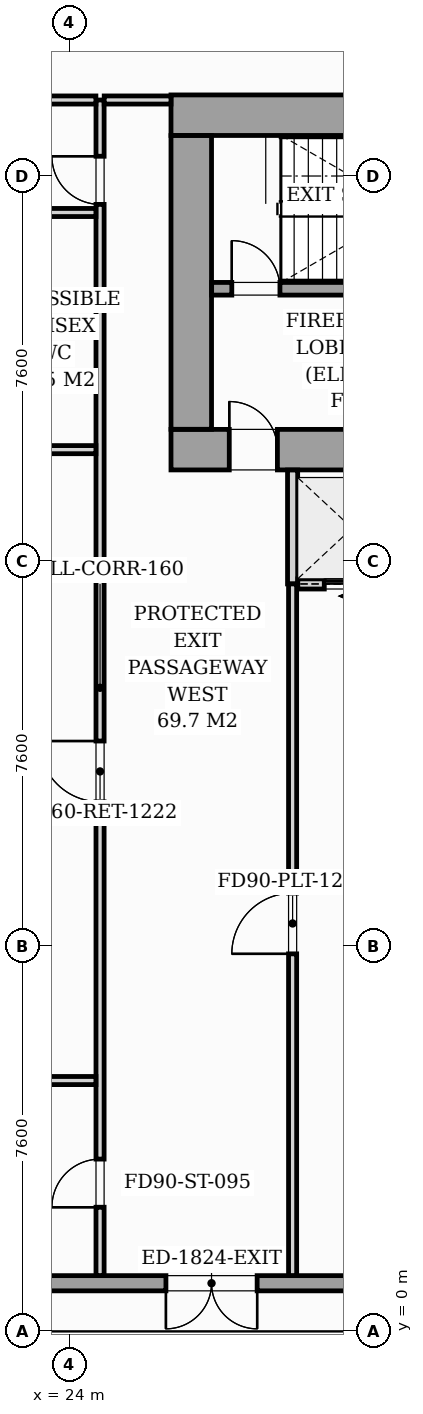
"""IFC4 building model, lengths in metres.
Left out: names, types, materials, properties, quantities, classifications, styles, units other than length and angle.
Written with IfcOpenShell. Run it as: python <this file> out.ifc"""

import sys

from ifc_helpers import new_model, si_unit, direction, frame, frame_2d, origin, origin_2d, place, context, subcontext, project, spatial, rectangle, i_section, extrude, source, transform, mapped, element, fill, save


model = new_model("IFC4")
c1 = context("Model", 3, precision=1e-05, world=origin(), true_north=direction((0.0, 1.0)))
c2 = subcontext(c1, "Body", "Model", "MODEL_VIEW")
j1 = project(units=[si_unit("LENGTHUNIT", "METRE"), si_unit("PLANEANGLEUNIT", "RADIAN")], contexts=[c1])
p1 = place(None, origin())
s1 = spatial("IfcSite", under=j1, at=p1, CompositionType="ELEMENT")
p2 = place(p1, origin())
s2 = spatial("IfcBuilding", under=s1, at=p2, CompositionType="ELEMENT")
p3 = place(p2, origin())
s3 = spatial("IfcBuildingStorey", under=s2, at=p3, CompositionType="ELEMENT", Elevation=0.0)
m1 = source(origin(), c2, "Body", "SweptSolid", [
    extrude(i_section(OverallWidth=0.437, OverallDepth=0.514, WebThickness=0.061, FlangeThickness=0.097, FilletRadius=0.018, at=origin_2d()), origin(), (0.0, 0.0, 1.0), 4.996),
])
for number, where, z_axis, x_axis in (
    (1, (26.4, 17.4, 0.002), (0.0, 0.0, 1.0), (1.0, 0.0, 0.0)),
    (2, (26.4, 24.0, 0.002), (0.0, 0.0, 1.0), (1.0, 0.0, 0.0)),
):
    element("IfcColumn", number, at=place(p3, frame(where, z_axis=z_axis, x_axis=x_axis)), inside=s3, PredefinedType="PILASTER", context=c2, shape_type="MappedRepresentation", body=[
        mapped(m1, transform((0.0, 0.0, 0.0), scale=1.0)),
    ])
p4 = place(p3, frame((47.0, 0.95, 0.0), z_axis=(0.0, 0.0, 1.0), x_axis=(-1.0, 0.0, 0.0)))
e3 = element("IfcWall", 3, at=p4, inside=s3, PredefinedType="STANDARD", context=c2, shape_type="SweptSolid", body=[
    extrude(rectangle(XDim=29.0, YDim=0.3, at=frame_2d((14.5, 0.0))), origin(), (0.0, 0.0, 1.0), 4.58),
])
p5 = place(p4, frame((1.15, 0.0, 0.0)))
e4 = element("IfcOpeningElement", 4, at=p5, cuts=e3, PredefinedType="OPENING", context=c2, shape_type="SweptSolid", body=[
    extrude(rectangle(XDim=1.8, YDim=2.4, at=frame_2d((0.9, 1.2))), frame((0.0, 0.16, 0.0), z_axis=(0.0, -1.0, 0.0), x_axis=(1.0, 0.0, 0.0)), (0.0, 0.0, 1.0), 0.32),
])
p6 = place(p4, frame((9.2, 0.0, 0.0)))
e5 = element("IfcOpeningElement", 5, at=p6, cuts=e3, PredefinedType="OPENING", context=c2, shape_type="SweptSolid", body=[
    extrude(rectangle(XDim=1.8, YDim=2.4, at=frame_2d((0.9, 1.2))), frame((0.0, 0.16, 0.0), z_axis=(0.0, -1.0, 0.0), x_axis=(1.0, 0.0, 0.0)), (0.0, 0.0, 1.0), 0.32),
])
p7 = place(p4, frame((11.3, 0.0, 0.65)))
e6 = element("IfcOpeningElement", 6, at=p7, cuts=e3, PredefinedType="OPENING", context=c2, shape_type="SweptSolid", body=[
    extrude(rectangle(XDim=2.0, YDim=2.4, at=frame_2d((1.0, 1.2))), frame((0.0, 0.16, 0.0), z_axis=(0.0, -1.0, 0.0), x_axis=(1.0, 0.0, 0.0)), (0.0, 0.0, 1.0), 0.32),
])
p8 = place(p4, frame((13.6, 0.0, 0.0)))
e7 = element("IfcOpeningElement", 7, at=p8, cuts=e3, PredefinedType="OPENING", context=c2, shape_type="SweptSolid", body=[
    extrude(rectangle(XDim=1.8, YDim=2.4, at=frame_2d((0.9, 1.2))), frame((0.0, 0.16, 0.0), z_axis=(0.0, -1.0, 0.0), x_axis=(1.0, 0.0, 0.0)), (0.0, 0.0, 1.0), 0.32),
])
p9 = place(p4, frame((19.3, 0.0, 0.0)))
e8 = element("IfcOpeningElement", 8, at=p9, cuts=e3, PredefinedType="OPENING", context=c2, shape_type="SweptSolid", body=[
    extrude(rectangle(XDim=1.8, YDim=2.4, at=frame_2d((0.9, 1.2))), frame((0.0, 0.16, 0.0), z_axis=(0.0, -1.0, 0.0), x_axis=(1.0, 0.0, 0.0)), (0.0, 0.0, 1.0), 0.32),
])
p10 = place(p4, frame((26.8, 0.0, 0.0)))
e9 = element("IfcOpeningElement", 9, at=p10, cuts=e3, PredefinedType="OPENING", context=c2, shape_type="SweptSolid", body=[
    extrude(rectangle(XDim=1.0, YDim=2.2, at=frame_2d((0.5, 1.1))), frame((0.0, 0.16, 0.0), z_axis=(0.0, -1.0, 0.0), x_axis=(1.0, 0.0, 0.0)), (0.0, 0.0, 1.0), 0.32),
])
p11 = place(p3, frame((26.0, 17.4, 0.0), z_axis=(0.0, 0.0, 1.0), x_axis=(1.0, 0.0, 0.0)))
e10 = element("IfcWall", 10, at=p11, inside=s3, PredefinedType="SHEAR", context=c2, shape_type="SweptSolid", body=[
    extrude(rectangle(XDim=20.0, YDim=0.8, at=frame_2d((10.0, 0.0))), origin(), (0.0, 0.0, 1.0), 5.0),
])
p12 = place(p11, frame((1.15, 0.0, 0.0)))
e11 = element("IfcOpeningElement", 11, at=p12, cuts=e10, PredefinedType="OPENING", context=c2, shape_type="SweptSolid", body=[
    extrude(rectangle(XDim=0.95, YDim=2.06, at=frame_2d((0.475, 1.03))), frame((0.0, 0.41, 0.0), z_axis=(0.0, -1.0, 0.0), x_axis=(1.0, 0.0, 0.0)), (0.0, 0.0, 1.0), 0.82),
])
p13 = place(p11, frame((9.58, 0.0, 0.0)))
e12 = element("IfcOpeningElement", 12, at=p13, cuts=e10, PredefinedType="OPENING", context=c2, shape_type="SweptSolid", body=[
    extrude(rectangle(XDim=0.9, YDim=2.06, at=frame_2d((0.45, 1.03))), frame((0.0, 0.41, 0.0), z_axis=(0.0, -1.0, 0.0), x_axis=(1.0, 0.0, 0.0)), (0.0, 0.0, 1.0), 0.82),
])
p14 = place(p11, frame((17.75, 0.0, 0.0)))
e13 = element("IfcOpeningElement", 13, at=p14, cuts=e10, PredefinedType="OPENING", context=c2, shape_type="SweptSolid", body=[
    extrude(rectangle(XDim=0.95, YDim=2.06, at=frame_2d((0.475, 1.03))), frame((0.0, 0.41, 0.0), z_axis=(0.0, -1.0, 0.0), x_axis=(1.0, 0.0, 0.0)), (0.0, 0.0, 1.0), 0.82),
])
p15 = place(p3, frame((26.0, 24.0, 0.0), z_axis=(0.0, 0.0, 1.0), x_axis=(1.0, 0.0, 0.0)))
e14 = element("IfcWall", 14, at=p15, inside=s3, PredefinedType="SHEAR", context=c2, shape_type="SweptSolid", body=[
    extrude(rectangle(XDim=20.0, YDim=0.8, at=frame_2d((10.0, 0.0))), origin(), (0.0, 0.0, 1.0), 5.0),
])
p16 = place(p3, frame((26.4, 17.802, 0.0), z_axis=(0.0, 0.0, 1.0), x_axis=(0.0, 1.0, 0.0)))
e15 = element("IfcWall", 15, at=p16, inside=s3, PredefinedType="SHEAR", context=c2, shape_type="SweptSolid", body=[
    extrude(rectangle(XDim=5.796, YDim=0.8, at=frame_2d((2.898, 0.0))), origin(), (0.0, 0.0, 1.0), 5.0),
])
p17 = place(p3, frame((26.802, 20.575, 0.0), z_axis=(0.0, 0.0, 1.0), x_axis=(1.0, 0.0, 0.0)))
e16 = element("IfcWall", 16, at=p17, inside=s3, PredefinedType="SOLIDWALL", context=c2, shape_type="SweptSolid", body=[
    extrude(rectangle(XDim=8.148, YDim=0.25, at=frame_2d((4.074, 0.0))), origin(), (0.0, 0.0, 1.0), 5.0),
])
p18 = place(p17, frame((0.398, 0.0, 0.0)))
e17 = element("IfcOpeningElement", 17, at=p18, cuts=e16, PredefinedType="OPENING", context=c2, shape_type="SweptSolid", body=[
    extrude(rectangle(XDim=0.95, YDim=2.06, at=frame_2d((0.475, 1.03))), frame((0.0, 0.135, 0.0), z_axis=(0.0, -1.0, 0.0), x_axis=(1.0, 0.0, 0.0)), (0.0, 0.0, 1.0), 0.27),
])
p19 = place(p3, frame((28.4, 14.75, 0.0), z_axis=(0.0, 0.0, 1.0), x_axis=(0.0, 1.0, 0.0)))
e18 = element("IfcWall", 18, at=p19, inside=s3, PredefinedType="PARTITIONING", context=c2, shape_type="SweptSolid", body=[
    extrude(rectangle(XDim=2.248, YDim=0.2, at=frame_2d((1.124, 0.0))), origin(), (0.0, 0.0, 1.0), 4.58),
])
p20 = place(p3, frame((28.502, 14.75, 0.0), z_axis=(0.0, 0.0, 1.0), x_axis=(1.0, 0.0, 0.0)))
e19 = element("IfcWall", 19, at=p20, inside=s3, PredefinedType="PARTITIONING", context=c2, shape_type="SweptSolid", body=[
    extrude(rectangle(XDim=2.146, YDim=0.2, at=frame_2d((1.073, 0.0))), origin(), (0.0, 0.0, 1.0), 4.58),
])
p21 = place(p20, frame((0.523, 0.0, 0.0)))
e20 = element("IfcOpeningElement", 20, at=p21, cuts=e19, PredefinedType="OPENING", context=c2, shape_type="SweptSolid", body=[
    extrude(rectangle(XDim=1.05, YDim=2.08, at=frame_2d((0.525, 1.04))), frame((0.0, 0.11, 0.0), z_axis=(0.0, -1.0, 0.0), x_axis=(1.0, 0.0, 0.0)), (0.0, 0.0, 1.0), 0.22),
])
p22 = place(p3, frame((24.6, 1.102, 0.0), z_axis=(0.0, 0.0, 1.0), x_axis=(0.0, 1.0, 0.0)))
e21 = element("IfcWall", 21, at=p22, inside=s3, PredefinedType="PARTITIONING", context=c2, shape_type="SweptSolid", body=[
    extrude(rectangle(XDim=23.198, YDim=0.16, at=frame_2d((11.599, 0.0))), origin(), (0.0, 0.0, 1.0), 4.58),
])
p23 = place(p22, frame((1.348, 0.0, 0.0)))
e22 = element("IfcOpeningElement", 22, at=p23, cuts=e21, PredefinedType="OPENING", context=c2, shape_type="SweptSolid", body=[
    extrude(rectangle(XDim=0.95, YDim=2.06, at=frame_2d((0.475, 1.03))), frame((0.0, 0.09, 0.0), z_axis=(0.0, -1.0, 0.0), x_axis=(1.0, 0.0, 0.0)), (0.0, 0.0, 1.0), 0.18),
])
p24 = place(p22, frame((9.348, 0.0, 0.0)))
e23 = element("IfcOpeningElement", 23, at=p24, cuts=e21, PredefinedType="OPENING", context=c2, shape_type="SweptSolid", body=[
    extrude(rectangle(XDim=1.2, YDim=2.08, at=frame_2d((0.6, 1.04))), frame((0.0, 0.09, 0.0), z_axis=(0.0, -1.0, 0.0), x_axis=(1.0, 0.0, 0.0)), (0.0, 0.0, 1.0), 0.18),
])
p25 = place(p22, frame((21.138, 0.0, 0.0)))
e24 = element("IfcOpeningElement", 24, at=p25, cuts=e21, PredefinedType="OPENING", context=c2, shape_type="SweptSolid", body=[
    extrude(rectangle(XDim=0.95, YDim=2.06, at=frame_2d((0.475, 1.03))), frame((0.0, 0.09, 0.0), z_axis=(0.0, -1.0, 0.0), x_axis=(1.0, 0.0, 0.0)), (0.0, 0.0, 1.0), 0.18),
])
p26 = place(p3, frame((28.4, 1.102, 0.0), z_axis=(0.0, 0.0, 1.0), x_axis=(0.0, 1.0, 0.0)))
e25 = element("IfcWall", 25, at=p26, inside=s3, PredefinedType="PARTITIONING", context=c2, shape_type="SweptSolid", body=[
    extrude(rectangle(XDim=13.648, YDim=0.16, at=frame_2d((6.824, 0.0))), origin(), (0.0, 0.0, 1.0), 4.58),
])
p27 = place(p26, frame((6.348, 0.0, 0.0)))
e26 = element("IfcOpeningElement", 26, at=p27, cuts=e25, PredefinedType="OPENING", context=c2, shape_type="SweptSolid", body=[
    extrude(rectangle(XDim=1.2, YDim=2.08, at=frame_2d((0.6, 1.04))), frame((0.0, 0.09, 0.0), z_axis=(0.0, -1.0, 0.0), x_axis=(1.0, 0.0, 0.0)), (0.0, 0.0, 1.0), 0.18),
])
p28 = place(p3, frame((18.532, 4.95, 0.0), z_axis=(0.0, 0.0, 1.0), x_axis=(1.0, 0.0, 0.0)))
e27 = element("IfcWall", 27, at=p28, inside=s3, PredefinedType="PARTITIONING", context=c2, shape_type="SweptSolid", body=[
    extrude(rectangle(XDim=5.986, YDim=0.16, at=frame_2d((2.993, 0.0))), origin(), (0.0, 0.0, 1.0), 4.58),
])
p29 = place(p3, frame((1.15, 17.4, 0.0), z_axis=(0.0, 0.0, 1.0), x_axis=(1.0, 0.0, 0.0)))
e28 = element("IfcWall", 28, at=p29, inside=s3, PredefinedType="PARTITIONING", context=c2, shape_type="SweptSolid", body=[
    extrude(rectangle(XDim=23.368, YDim=0.16, at=frame_2d((11.684, 0.0))), origin(), (0.0, 0.0, 1.0), 3.536),
])
p30 = place(p29, frame((6.575, 0.0, 0.0)))
e29 = element("IfcOpeningElement", 29, at=p30, cuts=e28, PredefinedType="OPENING", context=c2, shape_type="SweptSolid", body=[
    extrude(rectangle(XDim=0.95, YDim=2.06, at=frame_2d((0.475, 1.03))), frame((0.0, 0.09, 0.0), z_axis=(0.0, -1.0, 0.0), x_axis=(1.0, 0.0, 0.0)), (0.0, 0.0, 1.0), 0.18),
])
p31 = place(p3, frame((13.45, 22.08, 0.0), z_axis=(0.0, 0.0, 1.0), x_axis=(1.0, 0.0, 0.0)))
e30 = element("IfcWall", 30, at=p31, inside=s3, PredefinedType="PARTITIONING", context=c2, shape_type="SweptSolid", body=[
    extrude(rectangle(XDim=11.068, YDim=0.16, at=frame_2d((5.534, 0.0))), origin(), (0.0, 0.0, 1.0), 4.58),
])
p32 = place(p31, frame((1.6, 0.0, 0.0)))
e31 = element("IfcOpeningElement", 31, at=p32, cuts=e30, PredefinedType="OPENING", context=c2, shape_type="SweptSolid", body=[
    extrude(rectangle(XDim=0.9, YDim=2.05, at=frame_2d((0.45, 1.025))), frame((0.0, 0.09, 0.0), z_axis=(0.0, -1.0, 0.0), x_axis=(1.0, 0.0, 0.0)), (0.0, 0.0, 1.0), 0.18),
])
p33 = place(p31, frame((5.4, 0.0, 0.0)))
e32 = element("IfcOpeningElement", 32, at=p33, cuts=e30, PredefinedType="OPENING", context=c2, shape_type="SweptSolid", body=[
    extrude(rectangle(XDim=0.9, YDim=2.05, at=frame_2d((0.45, 1.025))), frame((0.0, 0.09, 0.0), z_axis=(0.0, -1.0, 0.0), x_axis=(1.0, 0.0, 0.0)), (0.0, 0.0, 1.0), 0.18),
])
p34 = place(p31, frame((8.95, 0.0, 0.0)))
e33 = element("IfcOpeningElement", 33, at=p34, cuts=e30, PredefinedType="OPENING", context=c2, shape_type="SweptSolid", body=[
    extrude(rectangle(XDim=0.95, YDim=2.1, at=frame_2d((0.475, 1.05))), frame((0.0, 0.09, 0.0), z_axis=(0.0, -1.0, 0.0), x_axis=(1.0, 0.0, 0.0)), (0.0, 0.0, 1.0), 0.18),
])
p35 = place(p3, frame((1.15, 24.3, 0.0), z_axis=(0.0, 0.0, 1.0), x_axis=(1.0, 0.0, 0.0)))
e34 = element("IfcWall", 34, at=p35, inside=s3, PredefinedType="PARTITIONING", context=c2, shape_type="SweptSolid", body=[
    extrude(rectangle(XDim=23.368, YDim=0.16, at=frame_2d((11.684, 0.0))), origin(), (0.0, 0.0, 1.0), 4.58),
])
p36 = place(p35, frame((8.575, 0.0, 0.0)))
e35 = element("IfcOpeningElement", 35, at=p36, cuts=e34, PredefinedType="OPENING", context=c2, shape_type="SweptSolid", body=[
    extrude(rectangle(XDim=0.95, YDim=2.06, at=frame_2d((0.475, 1.03))), frame((0.0, 0.09, 0.0), z_axis=(0.0, -1.0, 0.0), x_axis=(1.0, 0.0, 0.0)), (0.0, 0.0, 1.0), 0.18),
])
p37 = place(p3, frame((24.682, 24.3, 0.0), z_axis=(0.0, 0.0, 1.0), x_axis=(1.0, 0.0, 0.0)))
e36 = element("IfcWall", 36, at=p37, inside=s3, PredefinedType="PARTITIONING", context=c2, shape_type="SweptSolid", body=[
    extrude(rectangle(XDim=1.318, YDim=0.16, at=frame_2d((0.659, 0.0))), origin(), (0.0, 0.0, 1.0), 4.58),
])
m2 = source(origin(), c2, "Body", "SweptSolid", [
    extrude(rectangle(XDim=1.8, YDim=2.4, at=frame_2d((0.9, 1.2))), frame((0.0, 0.025, 0.0), z_axis=(0.0, -1.0, 0.0), x_axis=(1.0, 0.0, 0.0)), (0.0, 0.0, 1.0), 0.05),
])
p38 = place(p9, origin())
e37 = element("IfcDoor", 37, at=p38, inside=s3, OperationType="DOUBLE_DOOR_SINGLE_SWING", PredefinedType="DOOR", context=c2, shape_type="MappedRepresentation", body=[
    mapped(m2, transform((0.0, 0.0, 0.0), scale=1.0)),
])
fill(e8, e37)
m3 = source(origin(), c2, "Body", "SweptSolid", [
    extrude(rectangle(XDim=0.95, YDim=2.06, at=frame_2d((0.475, 1.03))), frame((0.0, 0.025, 0.0), z_axis=(0.0, -1.0, 0.0), x_axis=(1.0, 0.0, 0.0)), (0.0, 0.0, 1.0), 0.05),
])
p39 = place(p12, origin())
e38 = element("IfcDoor", 38, at=p39, inside=s3, OperationType="SINGLE_SWING_LEFT", PredefinedType="DOOR", context=c2, shape_type="MappedRepresentation", body=[
    mapped(m3, transform((0.0, 0.0, 0.0), scale=1.0)),
])
fill(e11, e38)
p40 = place(p18, origin())
e39 = element("IfcDoor", 39, at=p40, inside=s3, OperationType="SINGLE_SWING_LEFT", PredefinedType="DOOR", context=c2, shape_type="MappedRepresentation", body=[
    mapped(m3, transform((0.0, 0.0, 0.0), scale=1.0)),
])
fill(e17, e39)
m4 = source(origin(), c2, "Body", "SweptSolid", [
    extrude(rectangle(XDim=1.05, YDim=2.08, at=frame_2d((0.525, 1.04))), frame((0.0, 0.025, 0.0), z_axis=(0.0, -1.0, 0.0), x_axis=(1.0, 0.0, 0.0)), (0.0, 0.0, 1.0), 0.05),
])
p41 = place(p21, origin())
e40 = element("IfcDoor", 40, at=p41, inside=s3, OperationType="SLIDING_TO_LEFT", PredefinedType="DOOR", context=c2, shape_type="MappedRepresentation", body=[
    mapped(m4, transform((0.0, 0.0, 0.0), scale=1.0)),
])
fill(e20, e40)
m5 = source(origin(), c2, "Body", "SweptSolid", [
    extrude(rectangle(XDim=1.2, YDim=2.08, at=frame_2d((0.6, 1.04))), frame((0.0, 0.025, 0.0), z_axis=(0.0, -1.0, 0.0), x_axis=(1.0, 0.0, 0.0)), (0.0, 0.0, 1.0), 0.05),
])
p42 = place(p27, origin())
e41 = element("IfcDoor", 41, at=p42, inside=s3, OperationType="SINGLE_SWING_LEFT", PredefinedType="DOOR", context=c2, shape_type="MappedRepresentation", body=[
    mapped(m5, transform((0.0, 0.0, 0.0), scale=1.0)),
])
fill(e26, e41)
p43 = place(p23, origin())
e42 = element("IfcDoor", 42, at=p43, inside=s3, OperationType="SINGLE_SWING_LEFT", PredefinedType="DOOR", context=c2, shape_type="MappedRepresentation", body=[
    mapped(m3, transform((0.0, 0.0, 0.0), scale=1.0)),
])
fill(e22, e42)
m6 = source(origin(), c2, "Body", "SweptSolid", [
    extrude(rectangle(XDim=1.2, YDim=2.08, at=frame_2d((0.6, 1.04))), frame((0.0, 0.025, 0.0), z_axis=(0.0, -1.0, 0.0), x_axis=(1.0, 0.0, 0.0)), (0.0, 0.0, 1.0), 0.05),
])
p44 = place(p24, origin())
e43 = element("IfcDoor", 43, at=p44, inside=s3, OperationType="SINGLE_SWING_RIGHT", PredefinedType="DOOR", context=c2, shape_type="MappedRepresentation", body=[
    mapped(m6, transform((0.0, 0.0, 0.0), scale=1.0)),
])
fill(e23, e43)
m7 = source(origin(), c2, "Body", "SweptSolid", [
    extrude(rectangle(XDim=0.95, YDim=2.06, at=frame_2d((0.475, 1.03))), frame((0.0, 0.025, 0.0), z_axis=(0.0, -1.0, 0.0), x_axis=(1.0, 0.0, 0.0)), (0.0, 0.0, 1.0), 0.05),
])
p45 = place(p25, origin())
e44 = element("IfcDoor", 44, at=p45, inside=s3, OperationType="SINGLE_SWING_RIGHT", PredefinedType="DOOR", context=c2, shape_type="MappedRepresentation", body=[
    mapped(m7, transform((0.0, 0.0, 0.0), scale=1.0)),
])
fill(e24, e44)
save(model, sys.argv[1])
